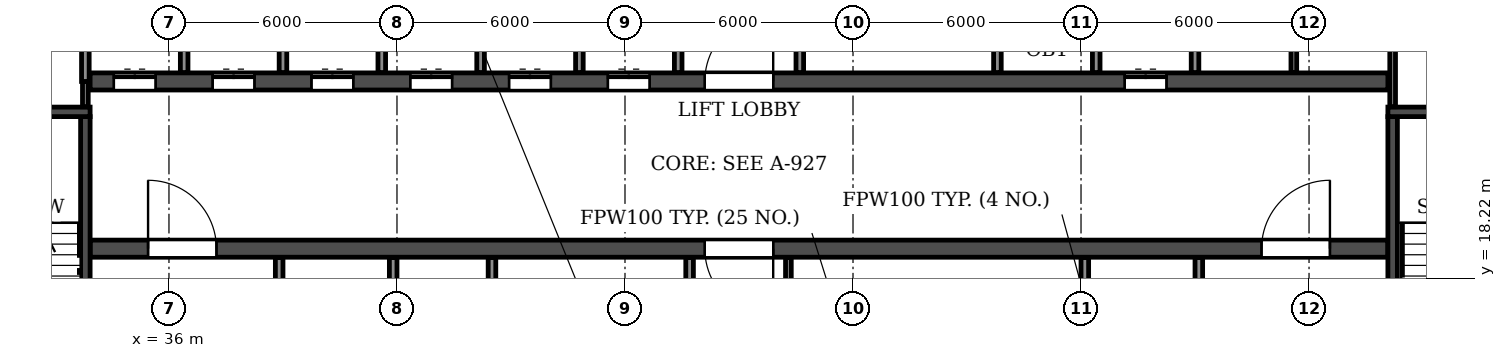
"""IFC4 building model, lengths in metres.
Left out: names, types, materials, properties, quantities, classifications, styles, units other than length and angle.
Written with IfcOpenShell. Run it as: python <this file> out.ifc"""

import sys

from ifc_helpers import new_model, si_unit, direction, frame, frame_2d, origin, place, context, subcontext, project, spatial, rectangle, extrude, element, fill, save


model = new_model("IFC4")
c1 = context("Model", 3, precision=1e-05, world=origin(), true_north=direction((0.0, 1.0)))
c2 = subcontext(c1, "Body", "Model", "MODEL_VIEW")
j1 = project(units=[si_unit("LENGTHUNIT", "METRE"), si_unit("PLANEANGLEUNIT", "RADIAN")], contexts=[c1])
p1 = place(None, origin())
s1 = spatial("IfcSite", under=j1, at=p1, CompositionType="ELEMENT")
p2 = place(p1, origin())
s2 = spatial("IfcBuilding", under=s1, at=p2, CompositionType="ELEMENT")
p3 = place(p2, frame((0.0, 0.0, 152.1)))
s3 = spatial("IfcBuildingStorey", under=s2, at=p3, CompositionType="ELEMENT", Elevation=152.1)
p4 = place(p3, frame((33.925, 19.0, 0.0), z_axis=(0.0, 0.0, 1.0), x_axis=(1.0, 0.0, 0.0)))
e1 = element("IfcWall", 1, at=p4, inside=s3, PredefinedType="SOLIDWALL", context=c2, shape_type="SweptSolid", body=[
    extrude(rectangle(XDim=34.15, YDim=0.45, at=frame_2d((17.075, 0.0))), origin(), (0.0, 0.0, 1.0), 3.07),
])
p5 = place(p4, frame((16.175, 0.0, 0.0)))
e2 = element("IfcOpeningElement", 2, at=p5, cuts=e1, PredefinedType="OPENING", context=c2, shape_type="SweptSolid", body=[
    extrude(rectangle(XDim=1.8, YDim=2.1, at=frame_2d((0.9, 1.05))), frame((0.0, 0.235, 0.0), z_axis=(0.0, -1.0, 0.0), x_axis=(1.0, 0.0, 0.0)), (0.0, 0.0, 1.0), 0.47),
])
p6 = place(p4, frame((1.525, 0.0, 0.0)))
e3 = element("IfcOpeningElement", 3, at=p6, cuts=e1, PredefinedType="OPENING", context=c2, shape_type="SweptSolid", body=[
    extrude(rectangle(XDim=1.8, YDim=2.1, at=frame_2d((0.9, 1.05))), frame((0.0, 0.235, 0.0), z_axis=(0.0, -1.0, 0.0), x_axis=(1.0, 0.0, 0.0)), (0.0, 0.0, 1.0), 0.47),
])
p7 = place(p4, frame((30.825, 0.0, 0.0)))
e4 = element("IfcOpeningElement", 4, at=p7, cuts=e1, PredefinedType="OPENING", context=c2, shape_type="SweptSolid", body=[
    extrude(rectangle(XDim=1.8, YDim=2.1, at=frame_2d((0.9, 1.05))), frame((0.0, 0.235, 0.0), z_axis=(0.0, -1.0, 0.0), x_axis=(1.0, 0.0, 0.0)), (0.0, 0.0, 1.0), 0.47),
])
p8 = place(p3, frame((33.925, 23.4, 0.0), z_axis=(0.0, 0.0, 1.0), x_axis=(1.0, 0.0, 0.0)))
e5 = element("IfcWall", 5, at=p8, inside=s3, PredefinedType="SOLIDWALL", context=c2, shape_type="SweptSolid", body=[
    extrude(rectangle(XDim=34.15, YDim=0.45, at=frame_2d((17.075, 0.0))), origin(), (0.0, 0.0, 1.0), 3.07),
])
p9 = place(p8, frame((16.175, 0.0, 0.0)))
e6 = element("IfcOpeningElement", 6, at=p9, cuts=e5, PredefinedType="OPENING", context=c2, shape_type="SweptSolid", body=[
    extrude(rectangle(XDim=1.8, YDim=2.1, at=frame_2d((0.9, 1.05))), frame((0.0, 0.235, 0.0), z_axis=(0.0, -1.0, 0.0), x_axis=(1.0, 0.0, 0.0)), (0.0, 0.0, 1.0), 0.47),
])
p10 = place(p8, frame((0.625, 0.0, 0.0)))
e7 = element("IfcOpeningElement", 7, at=p10, cuts=e5, PredefinedType="OPENING", context=c2, shape_type="SweptSolid", body=[
    extrude(rectangle(XDim=1.1, YDim=2.1, at=frame_2d((0.55, 1.05))), frame((0.0, 0.235, 0.0), z_axis=(0.0, -1.0, 0.0), x_axis=(1.0, 0.0, 0.0)), (0.0, 0.0, 1.0), 0.47),
])
p11 = place(p8, frame((3.225, 0.0, 0.0)))
e8 = element("IfcOpeningElement", 8, at=p11, cuts=e5, PredefinedType="OPENING", context=c2, shape_type="SweptSolid", body=[
    extrude(rectangle(XDim=1.1, YDim=2.1, at=frame_2d((0.55, 1.05))), frame((0.0, 0.235, 0.0), z_axis=(0.0, -1.0, 0.0), x_axis=(1.0, 0.0, 0.0)), (0.0, 0.0, 1.0), 0.47),
])
p12 = place(p8, frame((5.825, 0.0, 0.0)))
e9 = element("IfcOpeningElement", 9, at=p12, cuts=e5, PredefinedType="OPENING", context=c2, shape_type="SweptSolid", body=[
    extrude(rectangle(XDim=1.1, YDim=2.1, at=frame_2d((0.55, 1.05))), frame((0.0, 0.235, 0.0), z_axis=(0.0, -1.0, 0.0), x_axis=(1.0, 0.0, 0.0)), (0.0, 0.0, 1.0), 0.47),
])
p13 = place(p8, frame((8.425, 0.0, 0.0)))
e10 = element("IfcOpeningElement", 10, at=p13, cuts=e5, PredefinedType="OPENING", context=c2, shape_type="SweptSolid", body=[
    extrude(rectangle(XDim=1.1, YDim=2.1, at=frame_2d((0.55, 1.05))), frame((0.0, 0.235, 0.0), z_axis=(0.0, -1.0, 0.0), x_axis=(1.0, 0.0, 0.0)), (0.0, 0.0, 1.0), 0.47),
])
p14 = place(p8, frame((11.025, 0.0, 0.0)))
e11 = element("IfcOpeningElement", 11, at=p14, cuts=e5, PredefinedType="OPENING", context=c2, shape_type="SweptSolid", body=[
    extrude(rectangle(XDim=1.1, YDim=2.1, at=frame_2d((0.55, 1.05))), frame((0.0, 0.235, 0.0), z_axis=(0.0, -1.0, 0.0), x_axis=(1.0, 0.0, 0.0)), (0.0, 0.0, 1.0), 0.47),
])
p15 = place(p8, frame((13.625, 0.0, 0.0)))
e12 = element("IfcOpeningElement", 12, at=p15, cuts=e5, PredefinedType="OPENING", context=c2, shape_type="SweptSolid", body=[
    extrude(rectangle(XDim=1.1, YDim=2.1, at=frame_2d((0.55, 1.05))), frame((0.0, 0.235, 0.0), z_axis=(0.0, -1.0, 0.0), x_axis=(1.0, 0.0, 0.0)), (0.0, 0.0, 1.0), 0.47),
])
p16 = place(p8, frame((27.225, 0.0, 0.0)))
e13 = element("IfcOpeningElement", 13, at=p16, cuts=e5, PredefinedType="OPENING", context=c2, shape_type="SweptSolid", body=[
    extrude(rectangle(XDim=1.1, YDim=2.1, at=frame_2d((0.55, 1.05))), frame((0.0, 0.235, 0.0), z_axis=(0.0, -1.0, 0.0), x_axis=(1.0, 0.0, 0.0)), (0.0, 0.0, 1.0), 0.47),
])
p17 = place(p3, frame((33.8, 14.825, 0.0), z_axis=(0.0, 0.0, 1.0), x_axis=(0.0, 1.0, 0.0)))
e14 = element("IfcWall", 14, at=p17, inside=s3, PredefinedType="SOLIDWALL", context=c2, shape_type="SweptSolid", body=[
    extrude(rectangle(XDim=7.65, YDim=0.25, at=frame_2d((3.825, 0.0))), origin(), (0.0, 0.0, 1.0), 3.07),
])
p18 = place(p17, frame((0.475, 0.0, 0.0)))
e15 = element("IfcOpeningElement", 15, at=p18, cuts=e14, PredefinedType="OPENING", context=c2, shape_type="SweptSolid", body=[
    extrude(rectangle(XDim=1.0, YDim=2.1, at=frame_2d((0.5, 1.05))), frame((0.0, 0.135, 0.0), z_axis=(0.0, -1.0, 0.0), x_axis=(1.0, 0.0, 0.0)), (0.0, 0.0, 1.0), 0.27),
])
p19 = place(p3, frame((29.875, 22.6, 0.0), z_axis=(0.0, 0.0, 1.0), x_axis=(1.0, 0.0, 0.0)))
e16 = element("IfcWall", 16, at=p19, inside=s3, PredefinedType="SOLIDWALL", context=c2, shape_type="SweptSolid", body=[
    extrude(rectangle(XDim=4.05, YDim=0.25, at=frame_2d((2.025, 0.0))), origin(), (0.0, 0.0, 1.0), 3.07),
])
p20 = place(p3, frame((68.2, 14.825, 0.0), z_axis=(0.0, 0.0, 1.0), x_axis=(0.0, 1.0, 0.0)))
e17 = element("IfcWall", 17, at=p20, inside=s3, PredefinedType="SOLIDWALL", context=c2, shape_type="SweptSolid", body=[
    extrude(rectangle(XDim=7.65, YDim=0.25, at=frame_2d((3.825, 0.0))), origin(), (0.0, 0.0, 1.0), 3.07),
])
p21 = place(p20, frame((0.475, 0.0, 0.0)))
e18 = element("IfcOpeningElement", 18, at=p21, cuts=e17, PredefinedType="OPENING", context=c2, shape_type="SweptSolid", body=[
    extrude(rectangle(XDim=1.0, YDim=2.1, at=frame_2d((0.5, 1.05))), frame((0.0, 0.135, 0.0), z_axis=(0.0, -1.0, 0.0), x_axis=(1.0, 0.0, 0.0)), (0.0, 0.0, 1.0), 0.27),
])
p22 = place(p3, frame((68.075, 22.6, 0.0), z_axis=(0.0, 0.0, 1.0), x_axis=(1.0, 0.0, 0.0)))
e19 = element("IfcWall", 19, at=p22, inside=s3, PredefinedType="SOLIDWALL", context=c2, shape_type="SweptSolid", body=[
    extrude(rectangle(XDim=4.05, YDim=0.25, at=frame_2d((2.025, 0.0))), origin(), (0.0, 0.0, 1.0), 3.07),
])
for number, where, z_axis, x_axis in (
    (20, (52.3, 14.835, 0.0), (0.0, 0.0, 1.0), (0.0, 1.0, 0.0)),
    (21, (65.6, 23.635, 0.0), (0.0, 0.0, 1.0), (0.0, 1.0, 0.0)),
):
    element("IfcWall", number, at=place(p3, frame(where, z_axis=z_axis, x_axis=x_axis)), inside=s3, PredefinedType="PARTITIONING", context=c2, shape_type="SweptSolid", body=[
        extrude(rectangle(XDim=3.93, YDim=0.15, at=frame_2d((1.965, 0.0))), origin(), (0.0, 0.0, 1.0), 3.07),
    ])
for number, where, z_axis, x_axis in (
    (22, (44.5, 14.835, 0.0), (0.0, 0.0, 1.0), (0.0, 1.0, 0.0)),
    (23, (49.7, 14.835, 0.0), (0.0, 0.0, 1.0), (0.0, 1.0, 0.0)),
    (24, (52.6, 23.635, 0.0), (0.0, 0.0, 1.0), (0.0, 1.0, 0.0)),
):
    element("IfcWall", number, at=place(p3, frame(where, z_axis=z_axis, x_axis=x_axis)), inside=s3, PredefinedType="PARTITIONING", context=c2, shape_type="SweptSolid", body=[
        extrude(rectangle(XDim=3.93, YDim=0.2, at=frame_2d((1.965, 0.0))), origin(), (0.0, 0.0, 1.0), 3.07),
    ])
p23 = place(p3, frame((33.8, 22.735, 0.0), z_axis=(0.0, 0.0, 1.0), x_axis=(0.0, 1.0, 0.0)))
e25 = element("IfcWall", 25, at=p23, inside=s3, PredefinedType="PARTITIONING", context=c2, shape_type="SweptSolid", body=[
    extrude(rectangle(XDim=0.665, YDim=0.15, at=frame_2d((0.333, 0.0))), origin(), (0.0, 0.0, 1.0), 3.07),
])
p24 = place(p3, frame((68.2, 22.735, 0.0), z_axis=(0.0, 0.0, 1.0), x_axis=(0.0, 1.0, 0.0)))
e26 = element("IfcWall", 26, at=p24, inside=s3, PredefinedType="PARTITIONING", context=c2, shape_type="SweptSolid", body=[
    extrude(rectangle(XDim=4.83, YDim=0.15, at=frame_2d((2.415, 0.0))), origin(), (0.0, 0.0, 1.0), 3.07),
])
p25 = place(p3, frame((33.8, 23.4, 0.0), z_axis=(0.0, 0.0, 1.0), x_axis=(0.0, 1.0, 0.0)))
e27 = element("IfcWall", 27, at=p25, inside=s3, PredefinedType="PARTITIONING", context=c2, shape_type="SweptSolid", body=[
    extrude(rectangle(XDim=2.7, YDim=0.2, at=frame_2d((1.35, 0.0))), origin(), (0.0, 0.0, 1.0), 3.07),
])
p26 = place(p3, frame((36.4, 23.635, 0.0), z_axis=(0.0, 0.0, 1.0), x_axis=(0.0, 1.0, 0.0)))
e28 = element("IfcWall", 28, at=p26, inside=s3, PredefinedType="PARTITIONING", context=c2, shape_type="SweptSolid", body=[
    extrude(rectangle(XDim=2.465, YDim=0.2, at=frame_2d((1.232, 0.0))), origin(), (0.0, 0.0, 1.0), 3.07),
])
p27 = place(p3, frame((38.9, 14.835, 0.0), z_axis=(0.0, 0.0, 1.0), x_axis=(0.0, 1.0, 0.0)))
e29 = element("IfcWall", 29, at=p27, inside=s3, PredefinedType="PARTITIONING", context=c2, shape_type="SweptSolid", body=[
    extrude(rectangle(XDim=3.93, YDim=0.2, at=frame_2d((1.965, 0.0))), origin(), (0.0, 0.0, 1.0), 3.07),
])
p28 = place(p27, frame((1.415, 0.0, 0.0)))
e30 = element("IfcOpeningElement", 30, at=p28, cuts=e29, PredefinedType="OPENING", context=c2, shape_type="SweptSolid", body=[
    extrude(rectangle(XDim=1.1, YDim=2.1, at=frame_2d((0.55, 1.05))), frame((0.0, 0.11, 0.0), z_axis=(0.0, -1.0, 0.0), x_axis=(1.0, 0.0, 0.0)), (0.0, 0.0, 1.0), 0.22),
])
for number, where, z_axis, x_axis in (
    (31, (39.0, 23.635, 0.0), (0.0, 0.0, 1.0), (0.0, 1.0, 0.0)),
    (32, (41.6, 23.635, 0.0), (0.0, 0.0, 1.0), (0.0, 1.0, 0.0)),
):
    element("IfcWall", number, at=place(p3, frame(where, z_axis=z_axis, x_axis=x_axis)), inside=s3, PredefinedType="PARTITIONING", context=c2, shape_type="SweptSolid", body=[
        extrude(rectangle(XDim=2.465, YDim=0.2, at=frame_2d((1.232, 0.0))), origin(), (0.0, 0.0, 1.0), 3.07),
    ])
for number, where, z_axis, x_axis in (
    (33, (41.9, 14.835, 0.0), (0.0, 0.0, 1.0), (0.0, 1.0, 0.0)),
    (34, (44.2, 23.635, 0.0), (0.0, 0.0, 1.0), (0.0, 1.0, 0.0)),
    (35, (46.8, 23.635, 0.0), (0.0, 0.0, 1.0), (0.0, 1.0, 0.0)),
):
    element("IfcWall", number, at=place(p3, frame(where, z_axis=z_axis, x_axis=x_axis)), inside=s3, PredefinedType="PARTITIONING", context=c2, shape_type="SweptSolid", body=[
        extrude(rectangle(XDim=3.93, YDim=0.2, at=frame_2d((1.965, 0.0))), origin(), (0.0, 0.0, 1.0), 3.07),
    ])
for number, where, z_axis, x_axis in (
    (36, (49.4, 23.635, 0.0), (0.0, 0.0, 1.0), (0.0, 1.0, 0.0)),
    (37, (57.8, 23.635, 0.0), (0.0, 0.0, 1.0), (0.0, 1.0, 0.0)),
):
    element("IfcWall", number, at=place(p3, frame(where, z_axis=z_axis, x_axis=x_axis)), inside=s3, PredefinedType="PARTITIONING", context=c2, shape_type="SweptSolid", body=[
        extrude(rectangle(XDim=2.465, YDim=0.2, at=frame_2d((1.232, 0.0))), origin(), (0.0, 0.0, 1.0), 3.07),
    ])
p29 = place(p3, frame((60.1, 14.835, 0.0), z_axis=(0.0, 0.0, 1.0), x_axis=(0.0, 1.0, 0.0)))
e38 = element("IfcWall", 38, at=p29, inside=s3, PredefinedType="PARTITIONING", context=c2, shape_type="SweptSolid", body=[
    extrude(rectangle(XDim=3.93, YDim=0.2, at=frame_2d((1.965, 0.0))), origin(), (0.0, 0.0, 1.0), 3.07),
])
for number, where, z_axis, x_axis in (
    (39, (60.4, 23.635, 0.0), (0.0, 0.0, 1.0), (0.0, 1.0, 0.0)),
    (40, (63.0, 23.635, 0.0), (0.0, 0.0, 1.0), (0.0, 1.0, 0.0)),
):
    element("IfcWall", number, at=place(p3, frame(where, z_axis=z_axis, x_axis=x_axis)), inside=s3, PredefinedType="PARTITIONING", context=c2, shape_type="SweptSolid", body=[
        extrude(rectangle(XDim=2.465, YDim=0.2, at=frame_2d((1.232, 0.0))), origin(), (0.0, 0.0, 1.0), 3.07),
    ])
p30 = place(p3, frame((63.1, 14.835, 0.0), z_axis=(0.0, 0.0, 1.0), x_axis=(0.0, 1.0, 0.0)))
e41 = element("IfcWall", 41, at=p30, inside=s3, PredefinedType="PARTITIONING", context=c2, shape_type="SweptSolid", body=[
    extrude(rectangle(XDim=3.93, YDim=0.2, at=frame_2d((1.965, 0.0))), origin(), (0.0, 0.0, 1.0), 3.07),
])
p31 = place(p30, frame((1.415, 0.0, 0.0)))
e42 = element("IfcOpeningElement", 42, at=p31, cuts=e41, PredefinedType="OPENING", context=c2, shape_type="SweptSolid", body=[
    extrude(rectangle(XDim=1.1, YDim=2.1, at=frame_2d((0.55, 1.05))), frame((0.0, 0.11, 0.0), z_axis=(0.0, -1.0, 0.0), x_axis=(1.0, 0.0, 0.0)), (0.0, 0.0, 1.0), 0.22),
])
p32 = place(p9, origin())
e43 = element("IfcDoor", 43, at=p32, inside=s3, OperationType="DOUBLE_DOOR_SINGLE_SWING", PredefinedType="DOOR", context=c2, shape_type="SweptSolid", body=[
    extrude(rectangle(XDim=1.8, YDim=2.1, at=frame_2d((0.9, 1.05))), frame((0.0, 0.025, 0.0), z_axis=(0.0, -1.0, 0.0), x_axis=(1.0, 0.0, 0.0)), (0.0, 0.0, 1.0), 0.05),
])
fill(e6, e43)
p33 = place(p5, frame((1.8, 0.0, 0.0), z_axis=(0.0, 0.0, 1.0), x_axis=(-1.0, 0.0, 0.0)))
e44 = element("IfcDoor", 44, at=p33, inside=s3, OperationType="DOUBLE_DOOR_SINGLE_SWING", PredefinedType="DOOR", context=c2, shape_type="SweptSolid", body=[
    extrude(rectangle(XDim=1.8, YDim=2.1, at=frame_2d((0.9, 1.05))), frame((0.0, 0.025, 0.0), z_axis=(0.0, -1.0, 0.0), x_axis=(1.0, 0.0, 0.0)), (0.0, 0.0, 1.0), 0.05),
])
fill(e2, e44)
p34 = place(p10, origin())
e45 = element("IfcDoor", 45, at=p34, inside=s3, OperationType="DOUBLE_DOOR_SLIDING", PredefinedType="DOOR", context=c2, shape_type="SweptSolid", body=[
    extrude(rectangle(XDim=1.1, YDim=2.1, at=frame_2d((0.55, 1.05))), frame((0.0, 0.025, 0.0), z_axis=(0.0, -1.0, 0.0), x_axis=(1.0, 0.0, 0.0)), (0.0, 0.0, 1.0), 0.05),
])
fill(e7, e45)
p35 = place(p6, origin())
e46 = element("IfcDoor", 46, at=p35, inside=s3, OperationType="DOUBLE_DOOR_SINGLE_SWING", PredefinedType="DOOR", context=c2, shape_type="SweptSolid", body=[
    extrude(rectangle(XDim=1.8, YDim=2.1, at=frame_2d((0.9, 1.05))), frame((0.0, 0.025, 0.0), z_axis=(0.0, -1.0, 0.0), x_axis=(1.0, 0.0, 0.0)), (0.0, 0.0, 1.0), 0.05),
])
fill(e3, e46)
p36 = place(p11, origin())
e47 = element("IfcDoor", 47, at=p36, inside=s3, OperationType="DOUBLE_DOOR_SLIDING", PredefinedType="DOOR", context=c2, shape_type="SweptSolid", body=[
    extrude(rectangle(XDim=1.1, YDim=2.1, at=frame_2d((0.55, 1.05))), frame((0.0, 0.025, 0.0), z_axis=(0.0, -1.0, 0.0), x_axis=(1.0, 0.0, 0.0)), (0.0, 0.0, 1.0), 0.05),
])
fill(e8, e47)
p37 = place(p12, origin())
e48 = element("IfcDoor", 48, at=p37, inside=s3, OperationType="DOUBLE_DOOR_SLIDING", PredefinedType="DOOR", context=c2, shape_type="SweptSolid", body=[
    extrude(rectangle(XDim=1.1, YDim=2.1, at=frame_2d((0.55, 1.05))), frame((0.0, 0.025, 0.0), z_axis=(0.0, -1.0, 0.0), x_axis=(1.0, 0.0, 0.0)), (0.0, 0.0, 1.0), 0.05),
])
fill(e9, e48)
p38 = place(p13, origin())
e49 = element("IfcDoor", 49, at=p38, inside=s3, OperationType="DOUBLE_DOOR_SLIDING", PredefinedType="DOOR", context=c2, shape_type="SweptSolid", body=[
    extrude(rectangle(XDim=1.1, YDim=2.1, at=frame_2d((0.55, 1.05))), frame((0.0, 0.025, 0.0), z_axis=(0.0, -1.0, 0.0), x_axis=(1.0, 0.0, 0.0)), (0.0, 0.0, 1.0), 0.05),
])
fill(e10, e49)
p39 = place(p14, origin())
e50 = element("IfcDoor", 50, at=p39, inside=s3, OperationType="DOUBLE_DOOR_SLIDING", PredefinedType="DOOR", context=c2, shape_type="SweptSolid", body=[
    extrude(rectangle(XDim=1.1, YDim=2.1, at=frame_2d((0.55, 1.05))), frame((0.0, 0.025, 0.0), z_axis=(0.0, -1.0, 0.0), x_axis=(1.0, 0.0, 0.0)), (0.0, 0.0, 1.0), 0.05),
])
fill(e11, e50)
p40 = place(p15, origin())
e51 = element("IfcDoor", 51, at=p40, inside=s3, OperationType="DOUBLE_DOOR_SLIDING", PredefinedType="DOOR", context=c2, shape_type="SweptSolid", body=[
    extrude(rectangle(XDim=1.1, YDim=2.1, at=frame_2d((0.55, 1.05))), frame((0.0, 0.025, 0.0), z_axis=(0.0, -1.0, 0.0), x_axis=(1.0, 0.0, 0.0)), (0.0, 0.0, 1.0), 0.05),
])
fill(e12, e51)
p41 = place(p16, origin())
e52 = element("IfcDoor", 52, at=p41, inside=s3, OperationType="DOUBLE_DOOR_SLIDING", PredefinedType="DOOR", context=c2, shape_type="SweptSolid", body=[
    extrude(rectangle(XDim=1.1, YDim=2.1, at=frame_2d((0.55, 1.05))), frame((0.0, 0.025, 0.0), z_axis=(0.0, -1.0, 0.0), x_axis=(1.0, 0.0, 0.0)), (0.0, 0.0, 1.0), 0.05),
])
fill(e13, e52)
p42 = place(p7, origin())
e53 = element("IfcDoor", 53, at=p42, inside=s3, OperationType="DOUBLE_DOOR_SINGLE_SWING", PredefinedType="DOOR", context=c2, shape_type="SweptSolid", body=[
    extrude(rectangle(XDim=1.8, YDim=2.1, at=frame_2d((0.9, 1.05))), frame((0.0, 0.025, 0.0), z_axis=(0.0, -1.0, 0.0), x_axis=(1.0, 0.0, 0.0)), (0.0, 0.0, 1.0), 0.05),
])
fill(e4, e53)
save(model, sys.argv[1])
